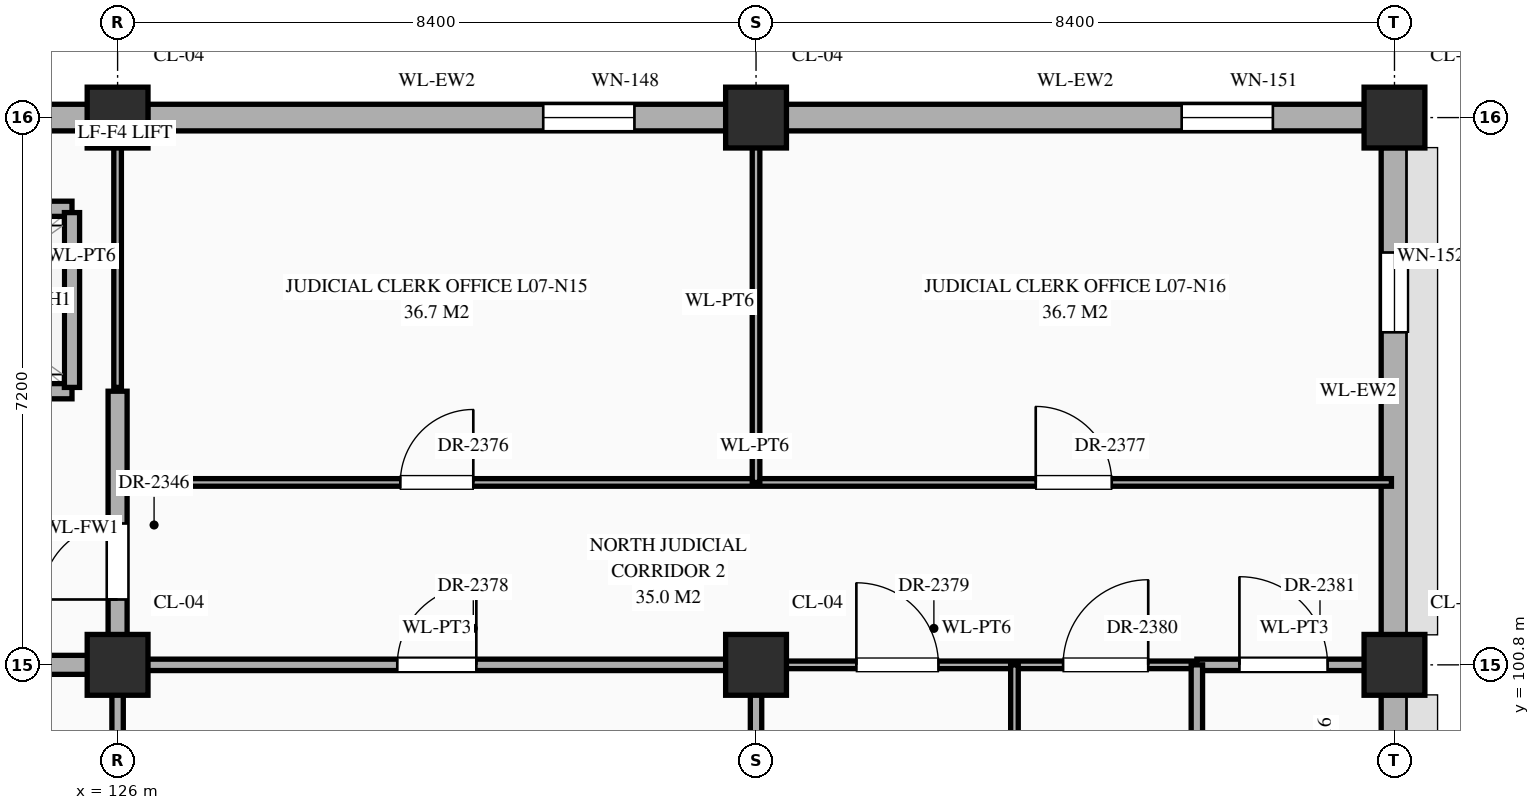
"""IFC4 building model, lengths in metres.
Left out: names, types, materials, properties, quantities, classifications, styles, units other than length and angle.
Written with IfcOpenShell. Run it as: python <this file> out.ifc"""

import sys

from ifc_helpers import new_model, si_unit, direction, frame, frame_2d, origin, origin_2d, place, context, subcontext, project, spatial, rectangle, extrude, element, fill, save


model = new_model("IFC4")
c1 = context("Model", 3, precision=1e-05, world=origin(), true_north=direction((0.0, 1.0)))
c2 = subcontext(c1, "Body", "Model", "MODEL_VIEW")
j1 = project(units=[si_unit("LENGTHUNIT", "METRE"), si_unit("PLANEANGLEUNIT", "RADIAN")], contexts=[c1])
p1 = place(None, origin())
s1 = spatial("IfcSite", under=j1, at=p1, CompositionType="ELEMENT")
p2 = place(p1, origin())
s2 = spatial("IfcBuilding", under=s1, at=p2, CompositionType="ELEMENT")
p3 = place(p2, frame((0.0, 0.0, 30.6)))
s3 = spatial("IfcBuildingStorey", under=s2, at=p3, CompositionType="ELEMENT", Elevation=30.6)
for number, where, z_axis, x_axis in (
    (1, (126.0, 100.8, 0.0), (0.0, 0.0, 1.0), (1.0, 0.0, 0.0)),
    (2, (126.0, 108.0, 0.0), (0.0, 0.0, 1.0), (1.0, 0.0, 0.0)),
    (3, (134.4, 100.8, 0.0), (0.0, 0.0, 1.0), (1.0, 0.0, 0.0)),
    (4, (134.4, 108.0, 0.0), (0.0, 0.0, 1.0), (1.0, 0.0, 0.0)),
    (5, (142.8, 100.8, 0.0), (0.0, 0.0, 1.0), (1.0, 0.0, 0.0)),
    (6, (142.8, 108.0, 0.0), (0.0, 0.0, 1.0), (1.0, 0.0, 0.0)),
):
    element("IfcColumn", number, at=place(p3, frame(where, z_axis=z_axis, x_axis=x_axis)), inside=s3, PredefinedType="COLUMN", context=c2, shape_type="SweptSolid", body=[
        extrude(rectangle(XDim=0.8, YDim=0.8, at=origin_2d()), origin(), (0.0, 0.0, 1.0), 4.5),
    ])
p4 = place(p3, frame((117.995, 108.0, 0.0), z_axis=(0.0, 0.0, 1.0), x_axis=(1.0, 0.0, 0.0)))
e7 = element("IfcWall", 7, at=p4, inside=s3, PredefinedType="STANDARD", context=c2, shape_type="SweptSolid", body=[
    extrude(rectangle(XDim=7.61, YDim=0.35, at=frame_2d((3.805, 0.0))), origin(), (0.0, 0.0, 1.0), 3.59),
])
p5 = place(p3, frame((126.395, 108.0, 0.0), z_axis=(0.0, 0.0, 1.0), x_axis=(1.0, 0.0, 0.0)))
e8 = element("IfcWall", 8, at=p5, inside=s3, PredefinedType="STANDARD", context=c2, shape_type="SweptSolid", body=[
    extrude(rectangle(XDim=7.61, YDim=0.35, at=frame_2d((3.805, 0.0))), origin(), (0.0, 0.0, 1.0), 3.5),
])
p6 = place(p5, frame((5.205, 0.0, 0.85)))
e9 = element("IfcOpeningElement", 9, at=p6, cuts=e8, PredefinedType="OPENING", context=c2, shape_type="SweptSolid", body=[
    extrude(rectangle(XDim=1.2, YDim=1.56, at=frame_2d((0.6, 0.78))), frame((0.0, 0.187, 0.0), z_axis=(0.0, -1.0, 0.0), x_axis=(1.0, 0.0, 0.0)), (0.0, 0.0, 1.0), 0.374),
])
p7 = place(p3, frame((142.8, 93.995, 0.0), z_axis=(0.0, 0.0, 1.0), x_axis=(0.0, 1.0, 0.0)))
e10 = element("IfcWall", 10, at=p7, inside=s3, PredefinedType="STANDARD", context=c2, shape_type="SweptSolid", body=[
    extrude(rectangle(XDim=6.41, YDim=0.35, at=frame_2d((3.205, 0.0))), origin(), (0.0, 0.0, 1.0), 3.65),
])
p8 = place(p7, frame((4.055, 0.0, 0.85)))
e11 = element("IfcOpeningElement", 11, at=p8, cuts=e10, PredefinedType="OPENING", context=c2, shape_type="SweptSolid", body=[
    extrude(rectangle(XDim=0.9, YDim=2.12, at=frame_2d((0.45, 1.06))), frame((0.0, 0.187, 0.0), z_axis=(0.0, -1.0, 0.0), x_axis=(1.0, 0.0, 0.0)), (0.0, 0.0, 1.0), 0.374),
])
p9 = place(p3, frame((134.795, 108.0, 0.0), z_axis=(0.0, 0.0, 1.0), x_axis=(1.0, 0.0, 0.0)))
e12 = element("IfcWall", 12, at=p9, inside=s3, PredefinedType="STANDARD", context=c2, shape_type="SweptSolid", body=[
    extrude(rectangle(XDim=7.61, YDim=0.35, at=frame_2d((3.805, 0.0))), origin(), (0.0, 0.0, 1.0), 3.65),
])
p10 = place(p9, frame((5.205, 0.0, 0.85)))
e13 = element("IfcOpeningElement", 13, at=p10, cuts=e12, PredefinedType="OPENING", context=c2, shape_type="SweptSolid", body=[
    extrude(rectangle(XDim=1.2, YDim=1.74, at=frame_2d((0.6, 0.87))), frame((0.0, 0.187, 0.0), z_axis=(0.0, -1.0, 0.0), x_axis=(1.0, 0.0, 0.0)), (0.0, 0.0, 1.0), 0.374),
])
p11 = place(p3, frame((142.8, 101.195, 0.0), z_axis=(0.0, 0.0, 1.0), x_axis=(0.0, 1.0, 0.0)))
e14 = element("IfcWall", 14, at=p11, inside=s3, PredefinedType="STANDARD", context=c2, shape_type="SweptSolid", body=[
    extrude(rectangle(XDim=6.41, YDim=0.35, at=frame_2d((3.205, 0.0))), origin(), (0.0, 0.0, 1.0), 3.65),
])
p12 = place(p11, frame((3.98, 0.0, 0.85)))
e15 = element("IfcOpeningElement", 15, at=p12, cuts=e14, PredefinedType="OPENING", context=c2, shape_type="SweptSolid", body=[
    extrude(rectangle(XDim=1.05, YDim=1.2, at=frame_2d((0.525, 0.6))), frame((0.0, 0.187, 0.0), z_axis=(0.0, -1.0, 0.0), x_axis=(1.0, 0.0, 0.0)), (0.0, 0.0, 1.0), 0.374),
])
p13 = place(p3, frame((121.8, 100.8, 0.0), z_axis=(0.0, 0.0, 1.0), x_axis=(1.0, 0.0, 0.0)))
e16 = element("IfcWall", 16, at=p13, inside=s3, PredefinedType="STANDARD", context=c2, shape_type="SweptSolid", body=[
    extrude(rectangle(XDim=4.2, YDim=0.25, at=frame_2d((2.1, 0.0))), origin(), (0.0, 0.0, 1.0), 3.39),
])
p14 = place(p3, frame((126.0, 100.8, 0.0), z_axis=(0.0, 0.0, 1.0), x_axis=(1.0, 0.0, 0.0)))
e17 = element("IfcWall", 17, at=p14, inside=s3, PredefinedType="STANDARD", context=c2, shape_type="SweptSolid", body=[
    extrude(rectangle(XDim=8.4, YDim=0.15, at=frame_2d((4.2, 0.0))), origin(), (0.0, 0.0, 1.0), 3.3),
])
p15 = place(p14, frame((3.68, 0.0, 0.0)))
e18 = element("IfcOpeningElement", 18, at=p15, cuts=e17, PredefinedType="OPENING", context=c2, shape_type="SweptSolid", body=[
    extrude(rectangle(XDim=1.04, YDim=2.2, at=frame_2d((0.52, 1.1))), frame((0.0, 0.087, 0.0), z_axis=(0.0, -1.0, 0.0), x_axis=(1.0, 0.0, 0.0)), (0.0, 0.0, 1.0), 0.174),
])
p16 = place(p3, frame((134.4, 100.8, 0.0), z_axis=(0.0, 0.0, 1.0), x_axis=(1.0, 0.0, 0.0)))
e19 = element("IfcWall", 19, at=p16, inside=s3, PredefinedType="STANDARD", context=c2, shape_type="SweptSolid", body=[
    extrude(rectangle(XDim=5.8, YDim=0.1, at=frame_2d((2.9, 0.0))), origin(), (0.0, 0.0, 1.0), 3.45),
])
p17 = place(p16, frame((1.32, 0.0, 0.0)))
e20 = element("IfcOpeningElement", 20, at=p17, cuts=e19, PredefinedType="OPENING", context=c2, shape_type="SweptSolid", body=[
    extrude(rectangle(XDim=1.08, YDim=2.25, at=frame_2d((0.54, 1.125))), frame((0.0, 0.062, 0.0), z_axis=(0.0, -1.0, 0.0), x_axis=(1.0, 0.0, 0.0)), (0.0, 0.0, 1.0), 0.124),
])
p18 = place(p16, frame((4.04, 0.0, 0.0)))
e21 = element("IfcOpeningElement", 21, at=p18, cuts=e19, PredefinedType="OPENING", context=c2, shape_type="SweptSolid", body=[
    extrude(rectangle(XDim=1.12, YDim=2.25, at=frame_2d((0.56, 1.125))), frame((0.0, 0.062, 0.0), z_axis=(0.0, -1.0, 0.0), x_axis=(1.0, 0.0, 0.0)), (0.0, 0.0, 1.0), 0.124),
])
p19 = place(p3, frame((140.2, 100.8, 0.0), z_axis=(0.0, 0.0, 1.0), x_axis=(1.0, 0.0, 0.0)))
e22 = element("IfcWall", 22, at=p19, inside=s3, PredefinedType="STANDARD", context=c2, shape_type="SweptSolid", body=[
    extrude(rectangle(XDim=2.56, YDim=0.15, at=frame_2d((1.28, 0.0))), origin(), (0.0, 0.0, 1.0), 3.45),
])
p20 = place(p19, frame((0.56, 0.0, 0.0)))
e23 = element("IfcOpeningElement", 23, at=p20, cuts=e22, PredefinedType="OPENING", context=c2, shape_type="SweptSolid", body=[
    extrude(rectangle(XDim=1.16, YDim=2.3, at=frame_2d((0.58, 1.15))), frame((0.0, 0.087, 0.0), z_axis=(0.0, -1.0, 0.0), x_axis=(1.0, 0.0, 0.0)), (0.0, 0.0, 1.0), 0.174),
])
p21 = place(p3, frame((126.0, 103.2, 0.0), z_axis=(0.0, 0.0, 1.0), x_axis=(1.0, 0.0, 0.0)))
e24 = element("IfcWall", 24, at=p21, inside=s3, PredefinedType="STANDARD", context=c2, shape_type="SweptSolid", body=[
    extrude(rectangle(XDim=16.76, YDim=0.1, at=frame_2d((8.38, 0.0))), origin(), (0.0, 0.0, 1.0), 4.15),
])
p22 = place(p21, frame((3.72, 0.0, 0.0)))
e25 = element("IfcOpeningElement", 25, at=p22, cuts=e24, PredefinedType="OPENING", context=c2, shape_type="SweptSolid", body=[
    extrude(rectangle(XDim=0.96, YDim=2.2, at=frame_2d((0.48, 1.1))), frame((0.0, 0.062, 0.0), z_axis=(0.0, -1.0, 0.0), x_axis=(1.0, 0.0, 0.0)), (0.0, 0.0, 1.0), 0.124),
])
p23 = place(p21, frame((12.08, 0.0, 0.0)))
e26 = element("IfcOpeningElement", 26, at=p23, cuts=e24, PredefinedType="OPENING", context=c2, shape_type="SweptSolid", body=[
    extrude(rectangle(XDim=1.0, YDim=2.25, at=frame_2d((0.5, 1.125))), frame((0.0, 0.062, 0.0), z_axis=(0.0, -1.0, 0.0), x_axis=(1.0, 0.0, 0.0)), (0.0, 0.0, 1.0), 0.124),
])
p24 = place(p3, frame((122.4, 104.4, 0.0), z_axis=(0.0, 0.0, 1.0), x_axis=(1.0, 0.0, 0.0)))
e27 = element("IfcWall", 27, at=p24, inside=s3, PredefinedType="STANDARD", context=c2, shape_type="SweptSolid", body=[
    extrude(rectangle(XDim=3.0, YDim=0.2, at=frame_2d((1.5, 0.0))), origin(), (0.0, 0.0, 1.0), 4.24),
])
p25 = place(p24, frame((0.9, 0.0, 0.0)))
e28 = element("IfcOpeningElement", 28, at=p25, cuts=e27, PredefinedType="OPENING", context=c2, shape_type="SweptSolid", body=[
    extrude(rectangle(XDim=1.2, YDim=2.15, at=frame_2d((0.6, 1.075))), frame((0.0, 0.112, 0.0), z_axis=(0.0, -1.0, 0.0), x_axis=(1.0, 0.0, 0.0)), (0.0, 0.0, 1.0), 0.224),
])
p26 = place(p3, frame((122.4, 106.8, 0.0), z_axis=(0.0, 0.0, 1.0), x_axis=(1.0, 0.0, 0.0)))
e29 = element("IfcWall", 29, at=p26, inside=s3, PredefinedType="STANDARD", context=c2, shape_type="SweptSolid", body=[
    extrude(rectangle(XDim=3.0, YDim=0.2, at=frame_2d((1.5, 0.0))), origin(), (0.0, 0.0, 1.0), 4.24),
])
p27 = place(p3, frame((125.4, 104.45, 0.0), z_axis=(0.0, 0.0, 1.0), x_axis=(0.0, 1.0, 0.0)))
e30 = element("IfcWall", 30, at=p27, inside=s3, PredefinedType="STANDARD", context=c2, shape_type="SweptSolid", body=[
    extrude(rectangle(XDim=2.3, YDim=0.2, at=frame_2d((1.15, 0.0))), origin(), (0.0, 0.0, 1.0), 4.24),
])
p28 = place(p3, frame((126.0, 96.0, 0.0), z_axis=(0.0, 0.0, 1.0), x_axis=(0.0, 1.0, 0.0)))
e31 = element("IfcWall", 31, at=p28, inside=s3, PredefinedType="STANDARD", context=c2, shape_type="SweptSolid", body=[
    extrude(rectangle(XDim=4.8, YDim=0.15, at=frame_2d((2.4, 0.0))), origin(), (0.0, 0.0, 1.0), 3.4),
])
p29 = place(p3, frame((126.0, 100.8, 0.0), z_axis=(0.0, 0.0, 1.0), x_axis=(0.0, 1.0, 0.0)))
e32 = element("IfcWall", 32, at=p29, inside=s3, PredefinedType="STANDARD", context=c2, shape_type="SweptSolid", body=[
    extrude(rectangle(XDim=3.6, YDim=0.25, at=frame_2d((1.8, 0.0))), origin(), (0.0, 0.0, 1.0), 3.4),
])
p30 = place(p29, frame((0.86, 0.0, 0.0)))
e33 = element("IfcOpeningElement", 33, at=p30, cuts=e32, PredefinedType="OPENING", context=c2, shape_type="SweptSolid", body=[
    extrude(rectangle(XDim=1.0, YDim=2.2, at=frame_2d((0.5, 1.1))), frame((0.0, 0.137, 0.0), z_axis=(0.0, -1.0, 0.0), x_axis=(1.0, 0.0, 0.0)), (0.0, 0.0, 1.0), 0.274),
])
p31 = place(p3, frame((126.0, 104.45, 0.0), z_axis=(0.0, 0.0, 1.0), x_axis=(0.0, 1.0, 0.0)))
e34 = element("IfcWall", 34, at=p31, inside=s3, PredefinedType="STANDARD", context=c2, shape_type="SweptSolid", body=[
    extrude(rectangle(XDim=3.46, YDim=0.1, at=frame_2d((1.73, 0.0))), origin(), (0.0, 0.0, 1.0), 3.4),
])
p32 = place(p3, frame((134.4, 96.0, 0.0), z_axis=(0.0, 0.0, 1.0), x_axis=(0.0, 1.0, 0.0)))
e35 = element("IfcWall", 35, at=p32, inside=s3, PredefinedType="STANDARD", context=c2, shape_type="SweptSolid", body=[
    extrude(rectangle(XDim=4.8, YDim=0.15, at=frame_2d((2.4, 0.0))), origin(), (0.0, 0.0, 1.0), 4.15),
])
p33 = place(p3, frame((134.4, 103.2, 0.0), z_axis=(0.0, 0.0, 1.0), x_axis=(0.0, 1.0, 0.0)))
e36 = element("IfcWall", 36, at=p33, inside=s3, PredefinedType="STANDARD", context=c2, shape_type="SweptSolid", body=[
    extrude(rectangle(XDim=4.76, YDim=0.1, at=frame_2d((2.38, 0.0))), origin(), (0.0, 0.0, 1.0), 3.4),
])
p34 = place(p3, frame((137.8, 96.0, 0.0), z_axis=(0.0, 0.0, 1.0), x_axis=(0.0, 1.0, 0.0)))
e37 = element("IfcWall", 37, at=p34, inside=s3, PredefinedType="STANDARD", context=c2, shape_type="SweptSolid", body=[
    extrude(rectangle(XDim=4.8, YDim=0.1, at=frame_2d((2.4, 0.0))), origin(), (0.0, 0.0, 1.0), 4.3),
])
p35 = place(p34, frame((1.87, 0.0, 0.0)))
e38 = element("IfcOpeningElement", 38, at=p35, cuts=e37, PredefinedType="OPENING", context=c2, shape_type="SweptSolid", body=[
    extrude(rectangle(XDim=1.06, YDim=2.4, at=frame_2d((0.53, 1.2))), frame((0.0, 0.062, 0.0), z_axis=(0.0, -1.0, 0.0), x_axis=(1.0, 0.0, 0.0)), (0.0, 0.0, 1.0), 0.124),
])
p36 = place(p3, frame((140.2, 96.0, 0.0), z_axis=(0.0, 0.0, 1.0), x_axis=(0.0, 1.0, 0.0)))
e39 = element("IfcWall", 39, at=p36, inside=s3, PredefinedType="STANDARD", context=c2, shape_type="SweptSolid", body=[
    extrude(rectangle(XDim=4.8, YDim=0.15, at=frame_2d((2.4, 0.0))), origin(), (0.0, 0.0, 1.0), 4.3),
])
p37 = place(p36, frame((1.83, 0.0, 0.0)))
e40 = element("IfcOpeningElement", 40, at=p37, cuts=e39, PredefinedType="OPENING", context=c2, shape_type="SweptSolid", body=[
    extrude(rectangle(XDim=1.14, YDim=2.4, at=frame_2d((0.57, 1.2))), frame((0.0, 0.087, 0.0), z_axis=(0.0, -1.0, 0.0), x_axis=(1.0, 0.0, 0.0)), (0.0, 0.0, 1.0), 0.174),
])
p38 = place(p6, origin())
e41 = element("IfcWindow", 41, at=p38, inside=s3, PartitioningType="SINGLE_PANEL", PredefinedType="WINDOW", context=c2, shape_type="SweptSolid", body=[
    extrude(rectangle(XDim=1.2, YDim=1.56, at=frame_2d((0.6, 0.78))), frame((0.0, 0.03, 0.0), z_axis=(0.0, -1.0, 0.0), x_axis=(1.0, 0.0, 0.0)), (0.0, 0.0, 1.0), 0.06),
])
fill(e9, e41)
p39 = place(p10, origin())
e42 = element("IfcWindow", 42, at=p39, inside=s3, PartitioningType="SINGLE_PANEL", PredefinedType="WINDOW", context=c2, shape_type="SweptSolid", body=[
    extrude(rectangle(XDim=1.2, YDim=1.74, at=frame_2d((0.6, 0.87))), frame((0.0, 0.03, 0.0), z_axis=(0.0, -1.0, 0.0), x_axis=(1.0, 0.0, 0.0)), (0.0, 0.0, 1.0), 0.06),
])
fill(e13, e42)
p40 = place(p12, origin())
e43 = element("IfcWindow", 43, at=p40, inside=s3, PartitioningType="SINGLE_PANEL", PredefinedType="WINDOW", context=c2, shape_type="SweptSolid", body=[
    extrude(rectangle(XDim=1.05, YDim=1.2, at=frame_2d((0.525, 0.6))), frame((0.0, 0.03, 0.0), z_axis=(0.0, -1.0, 0.0), x_axis=(1.0, 0.0, 0.0)), (0.0, 0.0, 1.0), 0.06),
])
fill(e15, e43)
p41 = place(p30, origin())
e44 = element("IfcDoor", 44, at=p41, inside=s3, OperationType="SINGLE_SWING_LEFT", PredefinedType="DOOR", context=c2, shape_type="SweptSolid", body=[
    extrude(rectangle(XDim=1.0, YDim=2.2, at=frame_2d((0.5, 1.1))), frame((0.0, 0.025, 0.0), z_axis=(0.0, -1.0, 0.0), x_axis=(1.0, 0.0, 0.0)), (0.0, 0.0, 1.0), 0.05),
])
fill(e33, e44)
p42 = place(p22, origin())
e45 = element("IfcDoor", 45, at=p42, inside=s3, OperationType="SINGLE_SWING_RIGHT", PredefinedType="DOOR", context=c2, shape_type="SweptSolid", body=[
    extrude(rectangle(XDim=0.96, YDim=2.2, at=frame_2d((0.48, 1.1))), frame((0.0, 0.025, 0.0), z_axis=(0.0, -1.0, 0.0), x_axis=(1.0, 0.0, 0.0)), (0.0, 0.0, 1.0), 0.05),
])
fill(e25, e45)
p43 = place(p23, origin())
e46 = element("IfcDoor", 46, at=p43, inside=s3, OperationType="SINGLE_SWING_LEFT", PredefinedType="DOOR", context=c2, shape_type="SweptSolid", body=[
    extrude(rectangle(XDim=1.0, YDim=2.25, at=frame_2d((0.5, 1.125))), frame((0.0, 0.025, 0.0), z_axis=(0.0, -1.0, 0.0), x_axis=(1.0, 0.0, 0.0)), (0.0, 0.0, 1.0), 0.05),
])
fill(e26, e46)
p44 = place(p15, origin())
e47 = element("IfcDoor", 47, at=p44, inside=s3, OperationType="SINGLE_SWING_RIGHT", PredefinedType="DOOR", context=c2, shape_type="SweptSolid", body=[
    extrude(rectangle(XDim=1.04, YDim=2.2, at=frame_2d((0.52, 1.1))), frame((0.0, 0.025, 0.0), z_axis=(0.0, -1.0, 0.0), x_axis=(1.0, 0.0, 0.0)), (0.0, 0.0, 1.0), 0.05),
])
fill(e18, e47)
p45 = place(p17, origin())
e48 = element("IfcDoor", 48, at=p45, inside=s3, OperationType="SINGLE_SWING_LEFT", PredefinedType="DOOR", context=c2, shape_type="SweptSolid", body=[
    extrude(rectangle(XDim=1.08, YDim=2.25, at=frame_2d((0.54, 1.125))), frame((0.0, 0.025, 0.0), z_axis=(0.0, -1.0, 0.0), x_axis=(1.0, 0.0, 0.0)), (0.0, 0.0, 1.0), 0.05),
])
fill(e20, e48)
p46 = place(p18, origin())
e49 = element("IfcDoor", 49, at=p46, inside=s3, OperationType="SINGLE_SWING_RIGHT", PredefinedType="DOOR", context=c2, shape_type="SweptSolid", body=[
    extrude(rectangle(XDim=1.12, YDim=2.25, at=frame_2d((0.56, 1.125))), frame((0.0, 0.025, 0.0), z_axis=(0.0, -1.0, 0.0), x_axis=(1.0, 0.0, 0.0)), (0.0, 0.0, 1.0), 0.05),
])
fill(e21, e49)
p47 = place(p20, origin())
e50 = element("IfcDoor", 50, at=p47, inside=s3, OperationType="SINGLE_SWING_LEFT", PredefinedType="DOOR", context=c2, shape_type="SweptSolid", body=[
    extrude(rectangle(XDim=1.16, YDim=2.3, at=frame_2d((0.58, 1.15))), frame((0.0, 0.025, 0.0), z_axis=(0.0, -1.0, 0.0), x_axis=(1.0, 0.0, 0.0)), (0.0, 0.0, 1.0), 0.05),
])
fill(e23, e50)
save(model, sys.argv[1])
